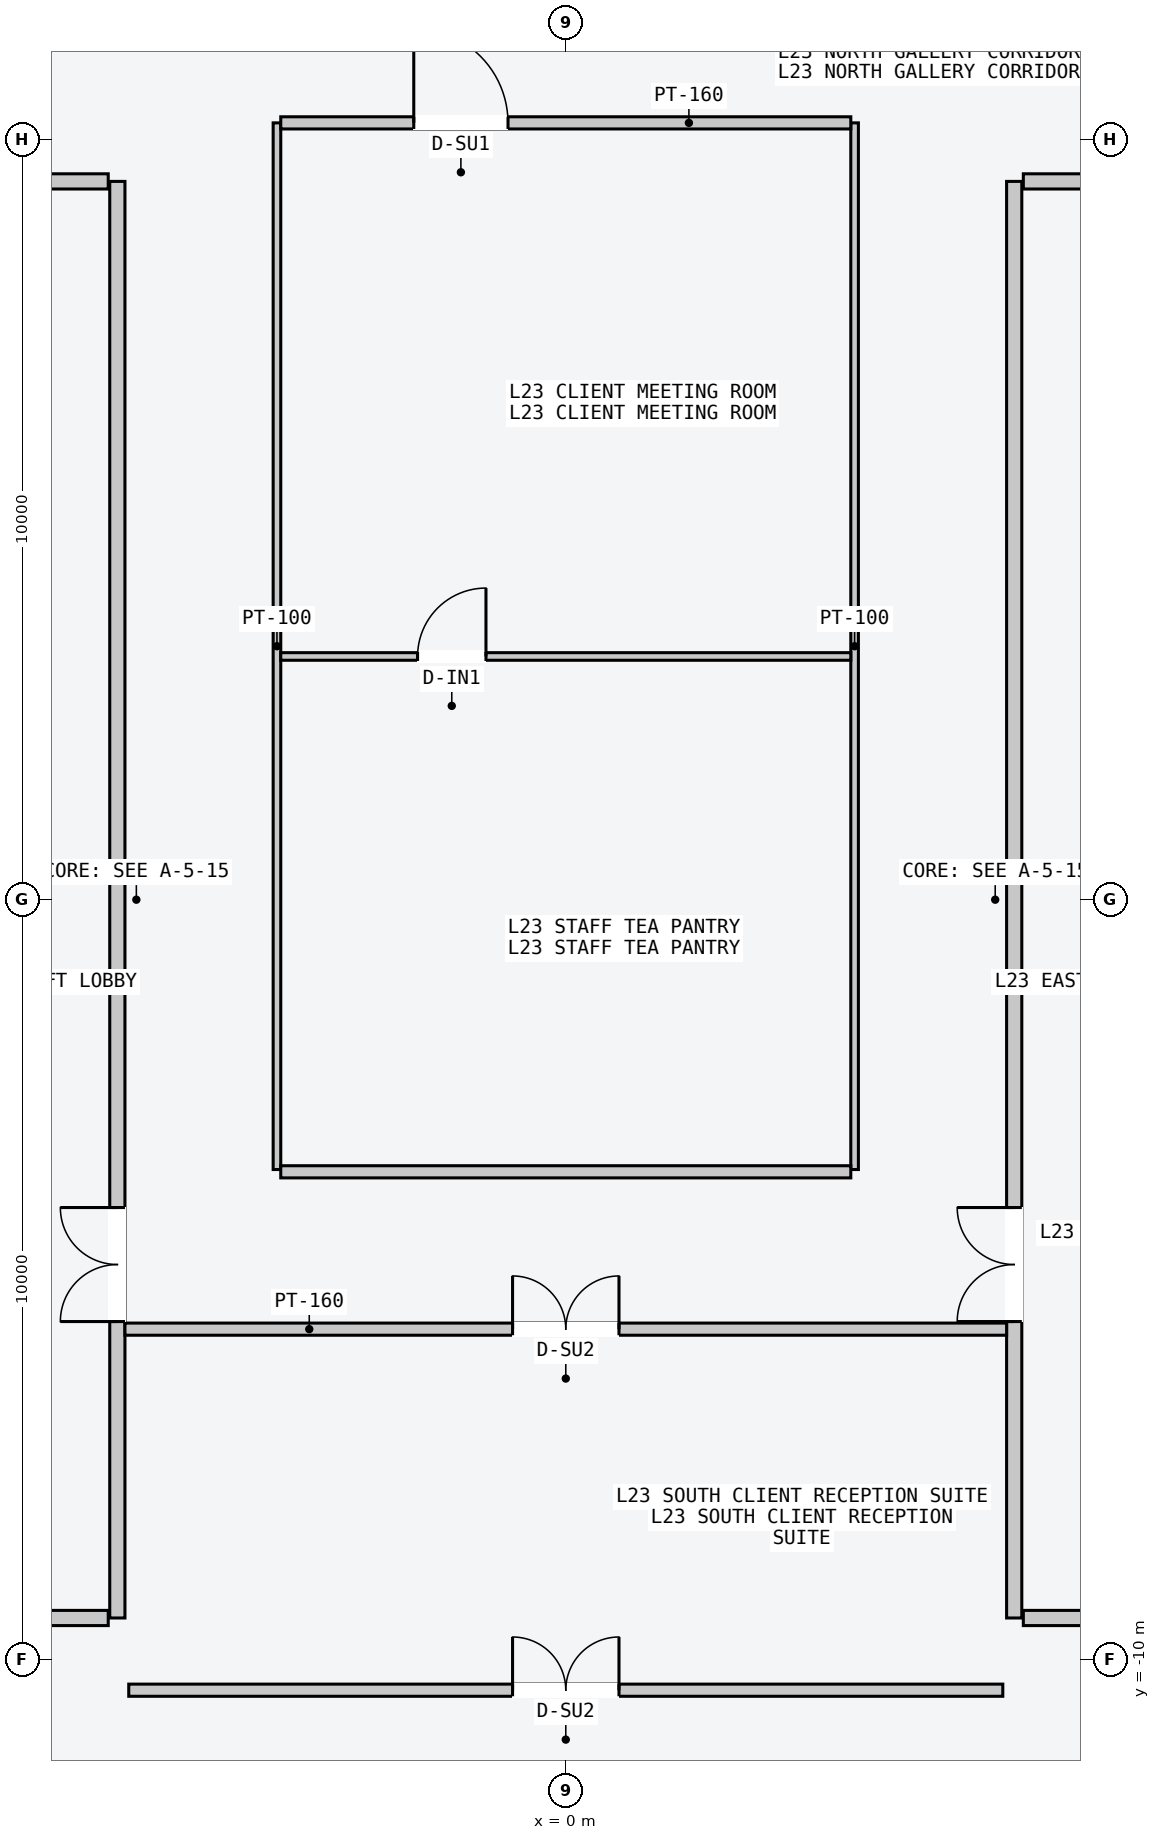
"""IFC4 building model, lengths in metres.
Left out: names, types, materials, properties, quantities, classifications, styles, units other than length and angle.
Written with IfcOpenShell. Run it as: python <this file> out.ifc"""

import sys

from ifc_helpers import new_model, si_unit, direction, frame, frame_2d, origin, place, context, subcontext, project, spatial, rectangle, extrude, element, fill, save


model = new_model("IFC4")
c1 = context("Model", 3, precision=1e-05, world=origin(), true_north=direction((0.0, 1.0)))
c2 = subcontext(c1, "Body", "Model", "MODEL_VIEW")
j1 = project(units=[si_unit("LENGTHUNIT", "METRE"), si_unit("PLANEANGLEUNIT", "RADIAN")], contexts=[c1])
p1 = place(None, origin())
s1 = spatial("IfcSite", under=j1, at=p1, CompositionType="ELEMENT")
p2 = place(p1, origin())
s2 = spatial("IfcBuilding", under=s1, at=p2, CompositionType="ELEMENT")
p3 = place(p2, frame((0.0, 0.0, 91.8)))
s3 = spatial("IfcBuildingStorey", under=s2, at=p3, CompositionType="ELEMENT", Elevation=91.8)
p4 = place(p3, frame((-5.9, -9.45, 0.0), z_axis=(0.0, 0.0, 1.0), x_axis=(0.0, 1.0, 0.0)))
e1 = element("IfcWall", 1, at=p4, inside=s3, PredefinedType="PARTITIONING", context=c2, shape_type="SweptSolid", body=[
    extrude(rectangle(XDim=18.9, YDim=0.2, at=frame_2d((9.45, 0.0))), origin(), (0.0, 0.0, 1.0), 3.4),
])
p5 = place(p4, frame((3.9, 0.0, 0.0)))
e2 = element("IfcOpeningElement", 2, at=p5, cuts=e1, PredefinedType="OPENING", context=c2, shape_type="SweptSolid", body=[
    extrude(rectangle(XDim=1.5, YDim=2.2, at=frame_2d((0.75, 1.1))), frame((0.0, 0.11, 0.0), z_axis=(0.0, -1.0, 0.0), x_axis=(1.0, 0.0, 0.0)), (0.0, 0.0, 1.0), 0.22),
])
for number, where, z_axis, x_axis in (
    (3, (-6.02, -9.45, 0.0), (0.0, 0.0, 1.0), (-1.0, 0.0, 0.0)),
    (4, (-6.02, 9.45, 0.0), (0.0, 0.0, 1.0), (-1.0, 0.0, 0.0)),
):
    element("IfcWall", number, at=place(p3, frame(where, z_axis=z_axis, x_axis=x_axis)), inside=s3, PredefinedType="PARTITIONING", context=c2, shape_type="SweptSolid", body=[
        extrude(rectangle(XDim=1.8, YDim=0.2, at=frame_2d((0.9, 0.0))), origin(), (0.0, 0.0, 1.0), 3.4),
    ])
p6 = place(p3, frame((5.9, -9.45, 0.0), z_axis=(0.0, 0.0, 1.0), x_axis=(0.0, 1.0, 0.0)))
e5 = element("IfcWall", 5, at=p6, inside=s3, PredefinedType="PARTITIONING", context=c2, shape_type="SweptSolid", body=[
    extrude(rectangle(XDim=18.9, YDim=0.2, at=frame_2d((9.45, 0.0))), origin(), (0.0, 0.0, 1.0), 3.4),
])
p7 = place(p6, frame((3.9, 0.0, 0.0)))
e6 = element("IfcOpeningElement", 6, at=p7, cuts=e5, PredefinedType="OPENING", context=c2, shape_type="SweptSolid", body=[
    extrude(rectangle(XDim=1.5, YDim=2.2, at=frame_2d((0.75, 1.1))), frame((0.0, 0.11, 0.0), z_axis=(0.0, -1.0, 0.0), x_axis=(1.0, 0.0, 0.0)), (0.0, 0.0, 1.0), 0.22),
])
for number, where, z_axis, x_axis in (
    (7, (6.02, -9.45, 0.0), (0.0, 0.0, 1.0), (1.0, 0.0, 0.0)),
    (8, (6.02, 9.45, 0.0), (0.0, 0.0, 1.0), (1.0, 0.0, 0.0)),
):
    element("IfcWall", number, at=place(p3, frame(where, z_axis=z_axis, x_axis=x_axis)), inside=s3, PredefinedType="PARTITIONING", context=c2, shape_type="SweptSolid", body=[
        extrude(rectangle(XDim=1.8, YDim=0.2, at=frame_2d((0.9, 0.0))), origin(), (0.0, 0.0, 1.0), 3.4),
    ])
for number, where, z_axis, x_axis in (
    (9, (-3.8, -3.55, 0.0), (0.0, 0.0, 1.0), (0.0, 1.0, 0.0)),
    (10, (3.8, -3.55, 0.0), (0.0, 0.0, 1.0), (0.0, 1.0, 0.0)),
):
    element("IfcWall", number, at=place(p3, frame(where, z_axis=z_axis, x_axis=x_axis)), inside=s3, PredefinedType="PARTITIONING", context=c2, shape_type="SweptSolid", body=[
        extrude(rectangle(XDim=13.77, YDim=0.1, at=frame_2d((6.885, 0.0))), origin(), (0.0, 0.0, 1.0), 3.4),
    ])
p8 = place(p3, frame((-3.75, -3.58, 0.0), z_axis=(0.0, 0.0, 1.0), x_axis=(1.0, 0.0, 0.0)))
e11 = element("IfcWall", 11, at=p8, inside=s3, PredefinedType="PARTITIONING", context=c2, shape_type="SweptSolid", body=[
    extrude(rectangle(XDim=7.5, YDim=0.16, at=frame_2d((3.75, 0.0))), origin(), (0.0, 0.0, 1.0), 3.4),
])
p9 = place(p3, frame((-3.75, 3.2, 0.0), z_axis=(0.0, 0.0, 1.0), x_axis=(1.0, 0.0, 0.0)))
e12 = element("IfcWall", 12, at=p9, inside=s3, PredefinedType="PARTITIONING", context=c2, shape_type="SweptSolid", body=[
    extrude(rectangle(XDim=7.5, YDim=0.1, at=frame_2d((3.75, 0.0))), origin(), (0.0, 0.0, 1.0), 3.4),
])
p10 = place(p9, frame((1.8, 0.0, 0.0)))
e13 = element("IfcOpeningElement", 13, at=p10, cuts=e12, PredefinedType="OPENING", context=c2, shape_type="SweptSolid", body=[
    extrude(rectangle(XDim=0.9, YDim=2.15, at=frame_2d((0.45, 1.075))), frame((0.0, 0.06, 0.0), z_axis=(0.0, -1.0, 0.0), x_axis=(1.0, 0.0, 0.0)), (0.0, 0.0, 1.0), 0.12),
])
p11 = place(p3, frame((-3.75, 10.22, 0.0), z_axis=(0.0, 0.0, 1.0), x_axis=(1.0, 0.0, 0.0)))
e14 = element("IfcWall", 14, at=p11, inside=s3, PredefinedType="PARTITIONING", context=c2, shape_type="SweptSolid", body=[
    extrude(rectangle(XDim=7.5, YDim=0.16, at=frame_2d((3.75, 0.0))), origin(), (0.0, 0.0, 1.0), 3.4),
])
p12 = place(p11, frame((1.75, 0.0, 0.0)))
e15 = element("IfcOpeningElement", 15, at=p12, cuts=e14, PredefinedType="OPENING", context=c2, shape_type="SweptSolid", body=[
    extrude(rectangle(XDim=1.24, YDim=2.24, at=frame_2d((0.62, 1.12))), frame((0.0, 0.09, 0.0), z_axis=(0.0, -1.0, 0.0), x_axis=(1.0, 0.0, 0.0)), (0.0, 0.0, 1.0), 0.18),
])
p13 = place(p3, frame((-5.8, -5.65, 0.0), z_axis=(0.0, 0.0, 1.0), x_axis=(1.0, 0.0, 0.0)))
e16 = element("IfcWall", 16, at=p13, inside=s3, PredefinedType="PARTITIONING", context=c2, shape_type="SweptSolid", body=[
    extrude(rectangle(XDim=11.6, YDim=0.16, at=frame_2d((5.8, 0.0))), origin(), (0.0, 0.0, 1.0), 3.4),
])
p14 = place(p13, frame((5.1, 0.0, 0.0)))
e17 = element("IfcOpeningElement", 17, at=p14, cuts=e16, PredefinedType="OPENING", context=c2, shape_type="SweptSolid", body=[
    extrude(rectangle(XDim=1.4, YDim=2.2, at=frame_2d((0.7, 1.1))), frame((0.0, 0.09, 0.0), z_axis=(0.0, -1.0, 0.0), x_axis=(1.0, 0.0, 0.0)), (0.0, 0.0, 1.0), 0.18),
])
p15 = place(p3, frame((-5.75, -10.4, 0.0), z_axis=(0.0, 0.0, 1.0), x_axis=(1.0, 0.0, 0.0)))
e18 = element("IfcWall", 18, at=p15, inside=s3, PredefinedType="PARTITIONING", context=c2, shape_type="SweptSolid", body=[
    extrude(rectangle(XDim=11.5, YDim=0.16, at=frame_2d((5.75, 0.0))), origin(), (0.0, 0.0, 1.0), 3.4),
])
p16 = place(p15, frame((5.05, 0.0, 0.0)))
e19 = element("IfcOpeningElement", 19, at=p16, cuts=e18, PredefinedType="OPENING", context=c2, shape_type="SweptSolid", body=[
    extrude(rectangle(XDim=1.4, YDim=2.2, at=frame_2d((0.7, 1.1))), frame((0.0, 0.09, 0.0), z_axis=(0.0, -1.0, 0.0), x_axis=(1.0, 0.0, 0.0)), (0.0, 0.0, 1.0), 0.18),
])
p17 = place(p5, origin())
e20 = element("IfcDoor", 20, at=p17, inside=s3, OperationType="DOUBLE_DOOR_SINGLE_SWING", PredefinedType="DOOR", context=c2, shape_type="SweptSolid", body=[
    extrude(rectangle(XDim=1.5, YDim=2.2, at=frame_2d((0.75, 1.1))), frame((0.0, 0.025, 0.0), z_axis=(0.0, -1.0, 0.0), x_axis=(1.0, 0.0, 0.0)), (0.0, 0.0, 1.0), 0.05),
])
fill(e2, e20)
p18 = place(p7, origin())
e21 = element("IfcDoor", 21, at=p18, inside=s3, OperationType="DOUBLE_DOOR_SINGLE_SWING", PredefinedType="DOOR", context=c2, shape_type="SweptSolid", body=[
    extrude(rectangle(XDim=1.5, YDim=2.2, at=frame_2d((0.75, 1.1))), frame((0.0, 0.025, 0.0), z_axis=(0.0, -1.0, 0.0), x_axis=(1.0, 0.0, 0.0)), (0.0, 0.0, 1.0), 0.05),
])
fill(e6, e21)
p19 = place(p10, origin())
e22 = element("IfcDoor", 22, at=p19, inside=s3, OperationType="SINGLE_SWING_RIGHT", PredefinedType="DOOR", context=c2, shape_type="SweptSolid", body=[
    extrude(rectangle(XDim=0.9, YDim=2.15, at=frame_2d((0.45, 1.075))), frame((0.0, 0.025, 0.0), z_axis=(0.0, -1.0, 0.0), x_axis=(1.0, 0.0, 0.0)), (0.0, 0.0, 1.0), 0.05),
])
fill(e13, e22)
p20 = place(p12, origin())
e23 = element("IfcDoor", 23, at=p20, inside=s3, OperationType="SINGLE_SWING_LEFT", PredefinedType="DOOR", context=c2, shape_type="SweptSolid", body=[
    extrude(rectangle(XDim=1.24, YDim=2.24, at=frame_2d((0.62, 1.12))), frame((0.0, 0.025, 0.0), z_axis=(0.0, -1.0, 0.0), x_axis=(1.0, 0.0, 0.0)), (0.0, 0.0, 1.0), 0.05),
])
fill(e15, e23)
p21 = place(p14, origin())
e24 = element("IfcDoor", 24, at=p21, inside=s3, OperationType="DOUBLE_DOOR_SINGLE_SWING", PredefinedType="DOOR", context=c2, shape_type="SweptSolid", body=[
    extrude(rectangle(XDim=1.4, YDim=2.2, at=frame_2d((0.7, 1.1))), frame((0.0, 0.025, 0.0), z_axis=(0.0, -1.0, 0.0), x_axis=(1.0, 0.0, 0.0)), (0.0, 0.0, 1.0), 0.05),
])
fill(e17, e24)
p22 = place(p16, origin())
e25 = element("IfcDoor", 25, at=p22, inside=s3, OperationType="DOUBLE_DOOR_SINGLE_SWING", PredefinedType="DOOR", context=c2, shape_type="SweptSolid", body=[
    extrude(rectangle(XDim=1.4, YDim=2.2, at=frame_2d((0.7, 1.1))), frame((0.0, 0.025, 0.0), z_axis=(0.0, -1.0, 0.0), x_axis=(1.0, 0.0, 0.0)), (0.0, 0.0, 1.0), 0.05),
])
fill(e19, e25)
save(model, sys.argv[1])
